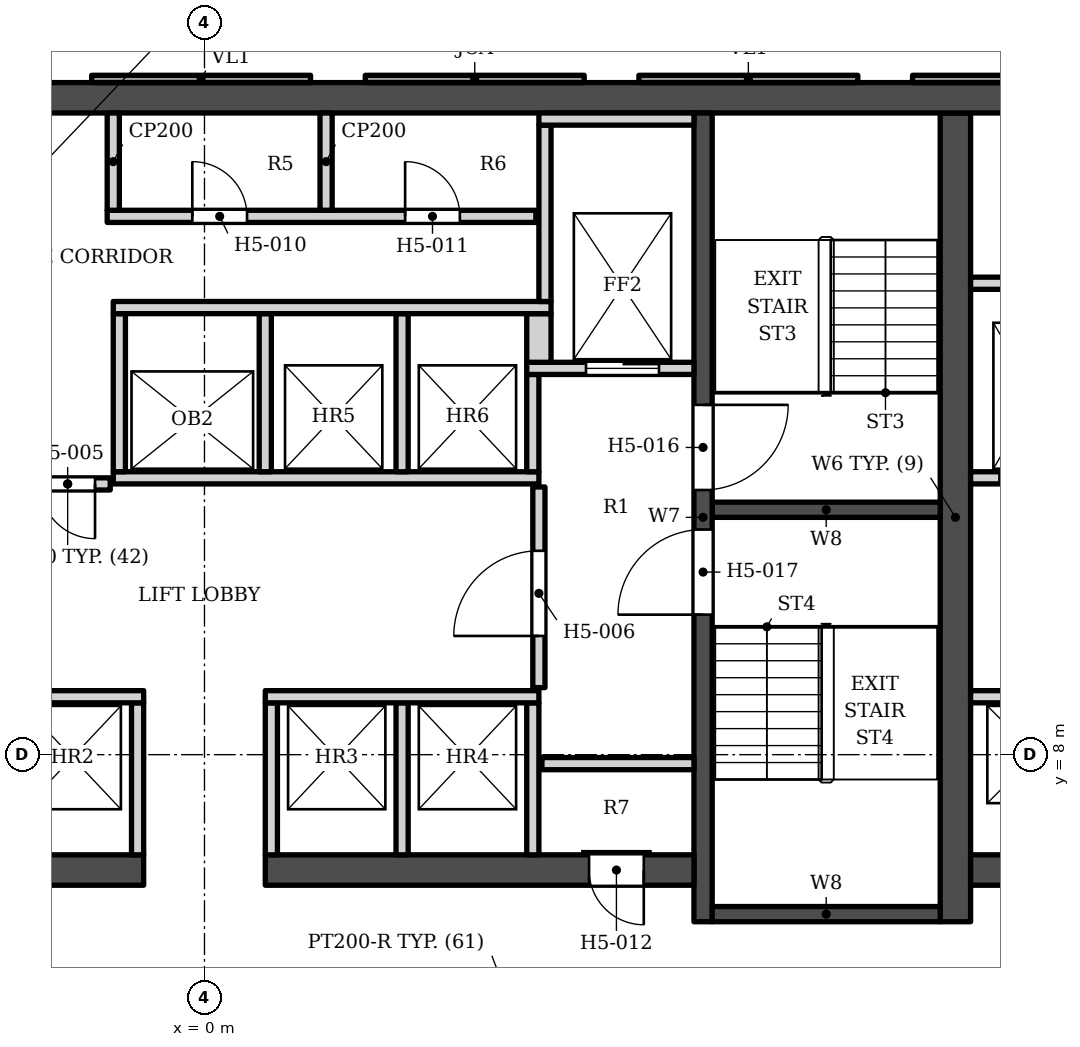
"""IFC4 building model, lengths in metres.
Left out: names, types, materials, properties, quantities, classifications, styles, units other than length and angle.
Written with IfcOpenShell. Run it as: python <this file> out.ifc"""

import sys

from ifc_helpers import new_model, si_unit, direction, frame, frame_2d, origin, place, context, subcontext, project, spatial, polyline, rectangle, outline, extrude, element, fill, save


model = new_model("IFC4")
c1 = context("Model", 3, precision=1e-05, world=origin(), true_north=direction((0.0, 1.0)))
c2 = subcontext(c1, "Body", "Model", "MODEL_VIEW")
j1 = project(units=[si_unit("LENGTHUNIT", "METRE"), si_unit("PLANEANGLEUNIT", "RADIAN")], contexts=[c1])
p1 = place(None, origin())
s1 = spatial("IfcSite", under=j1, at=p1, CompositionType="ELEMENT")
p2 = place(p1, origin())
s2 = spatial("IfcBuilding", under=s1, at=p2, CompositionType="ELEMENT")
p3 = place(p2, frame((0.0, 0.0, 91.8)))
s3 = spatial("IfcBuildingStorey", under=s2, at=p3, CompositionType="ELEMENT", Elevation=91.8)
p4 = place(p3, frame((-16.9, 18.802, 0.0), z_axis=(0.0, 0.0, 1.0), x_axis=(1.0, 0.0, 0.0)))
e1 = element("IfcWall", 1, at=p4, inside=s3, PredefinedType="SHEAR", context=c2, shape_type="SweptSolid", body=[
    extrude(rectangle(XDim=33.8, YDim=0.5, at=frame_2d((16.9, 0.0))), origin(), (0.0, 0.0, 1.0), 3.4),
])
p5 = place(p3, frame((12.35, 5.253, 0.0), z_axis=(0.0, 0.0, 1.0), x_axis=(0.0, 1.0, 0.0)))
e2 = element("IfcWall", 2, at=p5, inside=s3, PredefinedType="SHEAR", context=c2, shape_type="SweptSolid", body=[
    extrude(rectangle(XDim=13.3, YDim=0.5, at=frame_2d((6.65, 0.0))), origin(), (0.0, 0.0, 1.0), 3.4),
])
p6 = place(p3, frame((8.2, 5.253, 0.0), z_axis=(0.0, 0.0, 1.0), x_axis=(0.0, 1.0, 0.0)))
e3 = element("IfcWall", 3, at=p6, inside=s3, PredefinedType="SHEAR", context=c2, shape_type="SweptSolid", body=[
    extrude(rectangle(XDim=13.3, YDim=0.3, at=frame_2d((6.65, 0.0))), origin(), (0.0, 0.0, 1.0), 3.4),
])
p7 = place(p6, frame((7.1, 0.0, 0.0)))
e4 = element("IfcOpeningElement", 4, at=p7, cuts=e3, PredefinedType="OPENING", context=c2, shape_type="SweptSolid", body=[
    extrude(rectangle(XDim=1.4, YDim=2.1, at=frame_2d((0.7, 1.05))), frame((0.0, 0.16, 0.0), z_axis=(0.0, -1.0, 0.0), x_axis=(1.0, 0.0, 0.0)), (0.0, 0.0, 1.0), 0.32),
])
p8 = place(p6, frame((5.05, 0.0, 0.0)))
e5 = element("IfcOpeningElement", 5, at=p8, cuts=e3, PredefinedType="OPENING", context=c2, shape_type="SweptSolid", body=[
    extrude(rectangle(XDim=1.4, YDim=2.1, at=frame_2d((0.7, 1.05))), frame((0.0, 0.16, 0.0), z_axis=(0.0, -1.0, 0.0), x_axis=(1.0, 0.0, 0.0)), (0.0, 0.0, 1.0), 0.32),
])
for number, where, z_axis, x_axis in (
    (6, (8.35, 12.028, 0.0), (0.0, 0.0, 1.0), (1.0, 0.0, 0.0)),
    (7, (8.35, 5.378, 0.0), (0.0, 0.0, 1.0), (1.0, 0.0, 0.0)),
):
    element("IfcWall", number, at=place(p3, frame(where, z_axis=z_axis, x_axis=x_axis)), inside=s3, PredefinedType="SHEAR", context=c2, shape_type="SweptSolid", body=[
        extrude(rectangle(XDim=3.75, YDim=0.25, at=frame_2d((1.875, 0.0))), origin(), (0.0, 0.0, 1.0), 3.4),
    ])
p9 = place(p3, frame((-8.05, 6.103, 0.0), z_axis=(0.0, 0.0, 1.0), x_axis=(1.0, 0.0, 0.0)))
e8 = element("IfcWall", 8, at=p9, inside=s3, PredefinedType="SHEAR", context=c2, shape_type="SweptSolid", body=[
    extrude(rectangle(XDim=7.05, YDim=0.5, at=frame_2d((3.525, 0.0))), origin(), (0.0, 0.0, 1.0), 3.4),
])
p10 = place(p9, frame((0.825, 0.0, 0.0)))
e9 = element("IfcOpeningElement", 9, at=p10, cuts=e8, PredefinedType="OPENING", context=c2, shape_type="SweptSolid", body=[
    extrude(rectangle(XDim=0.9, YDim=2.1, at=frame_2d((0.45, 1.05))), frame((0.0, 0.26, 0.0), z_axis=(0.0, -1.0, 0.0), x_axis=(1.0, 0.0, 0.0)), (0.0, 0.0, 1.0), 0.52),
])
p11 = place(p3, frame((1.0, 6.103, 0.0), z_axis=(0.0, 0.0, 1.0), x_axis=(1.0, 0.0, 0.0)))
e10 = element("IfcWall", 10, at=p11, inside=s3, PredefinedType="SHEAR", context=c2, shape_type="SweptSolid", body=[
    extrude(rectangle(XDim=7.05, YDim=0.5, at=frame_2d((3.525, 0.0))), origin(), (0.0, 0.0, 1.0), 3.4),
])
p12 = place(p11, frame((5.325, 0.0, 0.0)))
e11 = element("IfcOpeningElement", 11, at=p12, cuts=e10, PredefinedType="OPENING", context=c2, shape_type="SweptSolid", body=[
    extrude(rectangle(XDim=0.9, YDim=2.1, at=frame_2d((0.45, 1.05))), frame((0.0, 0.26, 0.0), z_axis=(0.0, -1.0, 0.0), x_axis=(1.0, 0.0, 0.0)), (0.0, 0.0, 1.0), 0.52),
])
p13 = place(p3, frame((12.6, 6.103, 0.0), z_axis=(0.0, 0.0, 1.0), x_axis=(1.0, 0.0, 0.0)))
e12 = element("IfcWall", 12, at=p13, inside=s3, PredefinedType="SHEAR", context=c2, shape_type="SweptSolid", body=[
    extrude(rectangle(XDim=4.3, YDim=0.5, at=frame_2d((2.15, 0.0))), origin(), (0.0, 0.0, 1.0), 3.4),
])
p14 = place(p3, origin())
e13 = element("IfcWall", 13, at=p14, inside=s3, PredefinedType="SOLIDWALL", context=c2, shape_type="SweptSolid", body=[
    extrude(outline(polyline([(11.645, 19.173), (11.645, 19.052), (15.245, 19.052), (15.245, 19.173), (11.645, 19.173)])), origin(), (0.0, 0.0, 1.0), 2.65),
])
p15 = place(p3, origin())
e14 = element("IfcWall", 14, at=p15, inside=s3, PredefinedType="ELEMENTEDWALL", context=c2, shape_type="SweptSolid", body=[
    extrude(outline(polyline([(7.145, 19.173), (7.145, 19.052), (10.745, 19.052), (10.745, 19.173), (7.145, 19.173)])), origin(), (0.0, 0.0, 1.0), 2.65),
])
p16 = place(p3, origin())
e15 = element("IfcWall", 15, at=p16, inside=s3, PredefinedType="SOLIDWALL", context=c2, shape_type="SweptSolid", body=[
    extrude(outline(polyline([(2.645, 19.173), (2.645, 19.052), (6.245, 19.052), (6.245, 19.173), (2.645, 19.173)])), origin(), (0.0, 0.0, 1.0), 2.65),
])
p17 = place(p3, origin())
e16 = element("IfcWall", 16, at=p17, inside=s3, PredefinedType="ELEMENTEDWALL", context=c2, shape_type="SweptSolid", body=[
    extrude(outline(polyline([(-1.855, 19.173), (-1.855, 19.052), (1.745, 19.052), (1.745, 19.173), (-1.855, 19.173)])), origin(), (0.0, 0.0, 1.0), 2.65),
])
for number, where, z_axis, x_axis in (
    (17, (-1.1, 6.353, 0.0), (0.0, 0.0, 1.0), (0.0, 1.0, 0.0)),
    (18, (1.1, 6.353, 0.0), (0.0, 0.0, 1.0), (0.0, 1.0, 0.0)),
    (19, (3.25, 6.353, 0.0), (0.0, 0.0, 1.0), (0.0, 1.0, 0.0)),
    (20, (5.4, 6.353, 0.0), (0.0, 0.0, 1.0), (0.0, 1.0, 0.0)),
    (21, (5.55, 7.853, 0.0), (0.0, 0.0, 1.0), (1.0, 0.0, 0.0)),
):
    element("IfcWall", number, at=place(p3, frame(where, z_axis=z_axis, x_axis=x_axis)), inside=s3, PredefinedType="SOLIDWALL", context=c2, shape_type="SweptSolid", body=[
        extrude(rectangle(XDim=2.5, YDim=0.2, at=frame_2d((1.25, 0.0))), origin(), (0.0, 0.0, 1.0), 3.23),
    ])
for number, where, z_axis, x_axis in (
    (22, (-5.5, 8.953, 0.0), (0.0, 0.0, 1.0), (1.0, 0.0, 0.0)),
    (23, (1.0, 8.953, 0.0), (0.0, 0.0, 1.0), (1.0, 0.0, 0.0)),
):
    element("IfcWall", number, at=place(p3, frame(where, z_axis=z_axis, x_axis=x_axis)), inside=s3, PredefinedType="SOLIDWALL", context=c2, shape_type="SweptSolid", body=[
        extrude(rectangle(XDim=4.5, YDim=0.2, at=frame_2d((2.25, 0.0))), origin(), (0.0, 0.0, 1.0), 3.23),
    ])
p18 = place(p3, frame((12.6, 8.953, 0.0), z_axis=(0.0, 0.0, 1.0), x_axis=(1.0, 0.0, 0.0)))
e24 = element("IfcWall", 24, at=p18, inside=s3, PredefinedType="SOLIDWALL", context=c2, shape_type="SweptSolid", body=[
    extrude(rectangle(XDim=4.3, YDim=0.2, at=frame_2d((2.15, 0.0))), origin(), (0.0, 0.0, 1.0), 3.23),
])
p19 = place(p18, frame((0.525, 0.0, 0.0)))
e25 = element("IfcOpeningElement", 25, at=p19, cuts=e24, PredefinedType="OPENING", context=c2, shape_type="SweptSolid", body=[
    extrude(rectangle(XDim=1.1, YDim=2.1, at=frame_2d((0.55, 1.05))), frame((0.0, 0.11, 0.0), z_axis=(0.0, -1.0, 0.0), x_axis=(1.0, 0.0, 0.0)), (0.0, 0.0, 1.0), 0.22),
])
p20 = place(p18, frame((2.775, 0.0, 0.0)))
e26 = element("IfcOpeningElement", 26, at=p20, cuts=e24, PredefinedType="OPENING", context=c2, shape_type="SweptSolid", body=[
    extrude(rectangle(XDim=1.1, YDim=2.1, at=frame_2d((0.55, 1.05))), frame((0.0, 0.11, 0.0), z_axis=(0.0, -1.0, 0.0), x_axis=(1.0, 0.0, 0.0)), (0.0, 0.0, 1.0), 0.22),
])
p21 = place(p3, frame((5.5, 9.103, 0.0), z_axis=(0.0, 0.0, 1.0), x_axis=(0.0, 1.0, 0.0)))
e27 = element("IfcWall", 27, at=p21, inside=s3, PredefinedType="SOLIDWALL", context=c2, shape_type="SweptSolid", body=[
    extrude(rectangle(XDim=3.3, YDim=0.2, at=frame_2d((1.65, 0.0))), origin(), (0.0, 0.0, 1.0), 3.23),
])
p22 = place(p21, frame((0.85, 0.0, 0.0)))
e28 = element("IfcOpeningElement", 28, at=p22, cuts=e27, PredefinedType="OPENING", context=c2, shape_type="SweptSolid", body=[
    extrude(rectangle(XDim=1.4, YDim=2.1, at=frame_2d((0.7, 1.05))), frame((0.0, 0.11, 0.0), z_axis=(0.0, -1.0, 0.0), x_axis=(1.0, 0.0, 0.0)), (0.0, 0.0, 1.0), 0.22),
])
p23 = place(p3, frame((-2.95, 12.453, 0.0), z_axis=(0.0, 0.0, 1.0), x_axis=(1.0, 0.0, 0.0)))
e29 = element("IfcWall", 29, at=p23, inside=s3, PredefinedType="SOLIDWALL", context=c2, shape_type="SweptSolid", body=[
    extrude(rectangle(XDim=1.4, YDim=0.2, at=frame_2d((0.7, 0.0))), origin(), (0.0, 0.0, 1.0), 3.23),
])
p24 = place(p23, frame((0.25, 0.0, 0.0)))
e30 = element("IfcOpeningElement", 30, at=p24, cuts=e29, PredefinedType="OPENING", context=c2, shape_type="SweptSolid", body=[
    extrude(rectangle(XDim=0.9, YDim=2.1, at=frame_2d((0.45, 1.05))), frame((0.0, 0.11, 0.0), z_axis=(0.0, -1.0, 0.0), x_axis=(1.0, 0.0, 0.0)), (0.0, 0.0, 1.0), 0.22),
])
p25 = place(p3, frame((-1.5, 12.552, 0.0), z_axis=(0.0, 0.0, 1.0), x_axis=(1.0, 0.0, 0.0)))
e31 = element("IfcWall", 31, at=p25, inside=s3, PredefinedType="SOLIDWALL", context=c2, shape_type="SweptSolid", body=[
    extrude(rectangle(XDim=7.0, YDim=0.2, at=frame_2d((3.5, 0.0))), origin(), (0.0, 0.0, 1.0), 3.23),
])
p26 = place(p3, frame((12.6, 12.552, 0.0), z_axis=(0.0, 0.0, 1.0), x_axis=(1.0, 0.0, 0.0)))
e32 = element("IfcWall", 32, at=p26, inside=s3, PredefinedType="SOLIDWALL", context=c2, shape_type="SweptSolid", body=[
    extrude(rectangle(XDim=4.3, YDim=0.2, at=frame_2d((2.15, 0.0))), origin(), (0.0, 0.0, 1.0), 3.23),
])
p27 = place(p26, frame((0.475, 0.0, 0.0)))
e33 = element("IfcOpeningElement", 33, at=p27, cuts=e32, PredefinedType="OPENING", context=c2, shape_type="SweptSolid", body=[
    extrude(rectangle(XDim=1.2, YDim=2.1, at=frame_2d((0.6, 1.05))), frame((0.0, 0.11, 0.0), z_axis=(0.0, -1.0, 0.0), x_axis=(1.0, 0.0, 0.0)), (0.0, 0.0, 1.0), 0.22),
])
p28 = place(p26, frame((2.625, 0.0, 0.0)))
e34 = element("IfcOpeningElement", 34, at=p28, cuts=e32, PredefinedType="OPENING", context=c2, shape_type="SweptSolid", body=[
    extrude(rectangle(XDim=1.4, YDim=2.1, at=frame_2d((0.7, 1.05))), frame((0.0, 0.11, 0.0), z_axis=(0.0, -1.0, 0.0), x_axis=(1.0, 0.0, 0.0)), (0.0, 0.0, 1.0), 0.22),
])
for number, where, z_axis, x_axis in (
    (35, (-1.4, 12.653, 0.0), (0.0, 0.0, 1.0), (0.0, 1.0, 0.0)),
    (36, (1.0, 12.653, 0.0), (0.0, 0.0, 1.0), (0.0, 1.0, 0.0)),
    (37, (3.25, 12.653, 0.0), (0.0, 0.0, 1.0), (0.0, 1.0, 0.0)),
):
    element("IfcWall", number, at=place(p3, frame(where, z_axis=z_axis, x_axis=x_axis)), inside=s3, PredefinedType="SOLIDWALL", context=c2, shape_type="SweptSolid", body=[
        extrude(rectangle(XDim=2.6, YDim=0.2, at=frame_2d((1.3, 0.0))), origin(), (0.0, 0.0, 1.0), 3.23),
    ])
p29 = place(p3, frame((5.4, 12.653, 0.0), z_axis=(0.0, 0.0, 1.0), x_axis=(0.0, 1.0, 0.0)))
e38 = element("IfcWall", 38, at=p29, inside=s3, PredefinedType="SOLIDWALL", context=c2, shape_type="SweptSolid", body=[
    extrude(rectangle(XDim=1.6, YDim=0.2, at=frame_2d((0.8, 0.0))), origin(), (0.0, 0.0, 1.0), 3.23),
])
p30 = place(p3, frame((5.3, 14.353, 0.0), z_axis=(0.0, 0.0, 1.0), x_axis=(1.0, 0.0, 0.0)))
e39 = element("IfcWall", 39, at=p30, inside=s3, PredefinedType="SOLIDWALL", context=c2, shape_type="SweptSolid", body=[
    extrude(rectangle(XDim=2.75, YDim=0.2, at=frame_2d((1.375, 0.0))), origin(), (0.0, 0.0, 1.0), 3.23),
])
p31 = place(p30, frame((0.975, 0.0, 0.0)))
e40 = element("IfcOpeningElement", 40, at=p31, cuts=e39, PredefinedType="OPENING", context=c2, shape_type="SweptSolid", body=[
    extrude(rectangle(XDim=1.2, YDim=2.1, at=frame_2d((0.6, 1.05))), frame((0.0, 0.11, 0.0), z_axis=(0.0, -1.0, 0.0), x_axis=(1.0, 0.0, 0.0)), (0.0, 0.0, 1.0), 0.22),
])
p32 = place(p3, frame((5.5, 14.453, 0.0), z_axis=(0.0, 0.0, 1.0), x_axis=(0.0, 1.0, 0.0)))
e41 = element("IfcWall", 41, at=p32, inside=s3, PredefinedType="SOLIDWALL", context=c2, shape_type="SweptSolid", body=[
    extrude(rectangle(XDim=0.8, YDim=0.4, at=frame_2d((0.4, 0.0))), origin(), (0.0, 0.0, 1.0), 3.23),
])
p33 = place(p3, frame((-1.5, 15.353, 0.0), z_axis=(0.0, 0.0, 1.0), x_axis=(1.0, 0.0, 0.0)))
e42 = element("IfcWall", 42, at=p33, inside=s3, PredefinedType="SOLIDWALL", context=c2, shape_type="SweptSolid", body=[
    extrude(rectangle(XDim=7.2, YDim=0.2, at=frame_2d((3.6, 0.0))), origin(), (0.0, 0.0, 1.0), 3.23),
])
p34 = place(p3, frame((5.6, 15.453, 0.0), z_axis=(0.0, 0.0, 1.0), x_axis=(0.0, 1.0, 0.0)))
e43 = element("IfcWall", 43, at=p34, inside=s3, PredefinedType="SOLIDWALL", context=c2, shape_type="SweptSolid", body=[
    extrude(rectangle(XDim=2.9, YDim=0.2, at=frame_2d((1.45, 0.0))), origin(), (0.0, 0.0, 1.0), 3.23),
])
p35 = place(p3, frame((12.6, 15.753, 0.0), z_axis=(0.0, 0.0, 1.0), x_axis=(1.0, 0.0, 0.0)))
e44 = element("IfcWall", 44, at=p35, inside=s3, PredefinedType="SOLIDWALL", context=c2, shape_type="SweptSolid", body=[
    extrude(rectangle(XDim=4.3, YDim=0.2, at=frame_2d((2.15, 0.0))), origin(), (0.0, 0.0, 1.0), 3.23),
])
p36 = place(p3, frame((-1.6, 16.853, 0.0), z_axis=(0.0, 0.0, 1.0), x_axis=(1.0, 0.0, 0.0)))
e45 = element("IfcWall", 45, at=p36, inside=s3, PredefinedType="SOLIDWALL", context=c2, shape_type="SweptSolid", body=[
    extrude(rectangle(XDim=7.05, YDim=0.2, at=frame_2d((3.525, 0.0))), origin(), (0.0, 0.0, 1.0), 3.23),
])
p37 = place(p36, frame((1.4, 0.0, 0.0)))
e46 = element("IfcOpeningElement", 46, at=p37, cuts=e45, PredefinedType="OPENING", context=c2, shape_type="SweptSolid", body=[
    extrude(rectangle(XDim=0.9, YDim=2.1, at=frame_2d((0.45, 1.05))), frame((0.0, 0.11, 0.0), z_axis=(0.0, -1.0, 0.0), x_axis=(1.0, 0.0, 0.0)), (0.0, 0.0, 1.0), 0.22),
])
p38 = place(p36, frame((4.9, 0.0, 0.0)))
e47 = element("IfcOpeningElement", 47, at=p38, cuts=e45, PredefinedType="OPENING", context=c2, shape_type="SweptSolid", body=[
    extrude(rectangle(XDim=0.9, YDim=2.1, at=frame_2d((0.45, 1.05))), frame((0.0, 0.11, 0.0), z_axis=(0.0, -1.0, 0.0), x_axis=(1.0, 0.0, 0.0)), (0.0, 0.0, 1.0), 0.22),
])
for number, where, z_axis, x_axis in (
    (48, (-1.5, 16.953, 0.0), (0.0, 0.0, 1.0), (0.0, 1.0, 0.0)),
    (49, (2.0, 16.953, 0.0), (0.0, 0.0, 1.0), (0.0, 1.0, 0.0)),
):
    element("IfcWall", number, at=place(p3, frame(where, z_axis=z_axis, x_axis=x_axis)), inside=s3, PredefinedType="PARTITIONING", context=c2, shape_type="SweptSolid", body=[
        extrude(rectangle(XDim=1.6, YDim=0.2, at=frame_2d((0.8, 0.0))), origin(), (0.0, 0.0, 1.0), 3.23),
    ])
p39 = place(p3, frame((5.5, 18.453, 0.0), z_axis=(0.0, 0.0, 1.0), x_axis=(1.0, 0.0, 0.0)))
e50 = element("IfcWall", 50, at=p39, inside=s3, PredefinedType="SOLIDWALL", context=c2, shape_type="SweptSolid", body=[
    extrude(rectangle(XDim=2.55, YDim=0.2, at=frame_2d((1.275, 0.0))), origin(), (0.0, 0.0, 1.0), 3.23),
])
p40 = place(p31, origin())
e51 = element("IfcDoor", 51, at=p40, inside=s3, OperationType="DOUBLE_DOOR_SLIDING", PredefinedType="DOOR", context=c2, shape_type="SweptSolid", body=[
    extrude(rectangle(XDim=1.2, YDim=2.1, at=frame_2d((0.6, 1.05))), frame((0.0, 0.025, 0.0), z_axis=(0.0, -1.0, 0.0), x_axis=(1.0, 0.0, 0.0)), (0.0, 0.0, 1.0), 0.05),
])
fill(e40, e51)
p41 = place(p27, origin())
e52 = element("IfcDoor", 52, at=p41, inside=s3, OperationType="DOUBLE_DOOR_SLIDING", PredefinedType="DOOR", context=c2, shape_type="SweptSolid", body=[
    extrude(rectangle(XDim=1.2, YDim=2.1, at=frame_2d((0.6, 1.05))), frame((0.0, 0.025, 0.0), z_axis=(0.0, -1.0, 0.0), x_axis=(1.0, 0.0, 0.0)), (0.0, 0.0, 1.0), 0.05),
])
fill(e33, e52)
p42 = place(p7, origin())
e53 = element("IfcDoor", 53, at=p42, inside=s3, OperationType="SINGLE_SWING_RIGHT", PredefinedType="DOOR", context=c2, shape_type="SweptSolid", body=[
    extrude(rectangle(XDim=1.4, YDim=2.1, at=frame_2d((0.7, 1.05))), frame((0.0, 0.025, 0.0), z_axis=(0.0, -1.0, 0.0), x_axis=(1.0, 0.0, 0.0)), (0.0, 0.0, 1.0), 0.05),
])
fill(e4, e53)
p43 = place(p8, origin())
e54 = element("IfcDoor", 54, at=p43, inside=s3, OperationType="SINGLE_SWING_LEFT", PredefinedType="DOOR", context=c2, shape_type="SweptSolid", body=[
    extrude(rectangle(XDim=1.4, YDim=2.1, at=frame_2d((0.7, 1.05))), frame((0.0, 0.025, 0.0), z_axis=(0.0, -1.0, 0.0), x_axis=(1.0, 0.0, 0.0)), (0.0, 0.0, 1.0), 0.05),
])
fill(e5, e54)
p44 = place(p24, origin())
e55 = element("IfcDoor", 55, at=p44, inside=s3, OperationType="SINGLE_SWING_RIGHT", PredefinedType="DOOR", context=c2, shape_type="SweptSolid", body=[
    extrude(rectangle(XDim=0.9, YDim=2.1, at=frame_2d((0.45, 1.05))), frame((0.0, 0.025, 0.0), z_axis=(0.0, -1.0, 0.0), x_axis=(1.0, 0.0, 0.0)), (0.0, 0.0, 1.0), 0.05),
])
fill(e30, e55)
p45 = place(p22, origin())
e56 = element("IfcDoor", 56, at=p45, inside=s3, OperationType="SINGLE_SWING_LEFT", PredefinedType="DOOR", context=c2, shape_type="SweptSolid", body=[
    extrude(rectangle(XDim=1.4, YDim=2.1, at=frame_2d((0.7, 1.05))), frame((0.0, 0.025, 0.0), z_axis=(0.0, -1.0, 0.0), x_axis=(1.0, 0.0, 0.0)), (0.0, 0.0, 1.0), 0.05),
])
fill(e28, e56)
p46 = place(p37, origin())
e57 = element("IfcDoor", 57, at=p46, inside=s3, OperationType="SINGLE_SWING_LEFT", PredefinedType="DOOR", context=c2, shape_type="SweptSolid", body=[
    extrude(rectangle(XDim=0.9, YDim=2.1, at=frame_2d((0.45, 1.05))), frame((0.0, 0.025, 0.0), z_axis=(0.0, -1.0, 0.0), x_axis=(1.0, 0.0, 0.0)), (0.0, 0.0, 1.0), 0.05),
])
fill(e46, e57)
p47 = place(p38, origin())
e58 = element("IfcDoor", 58, at=p47, inside=s3, OperationType="SINGLE_SWING_LEFT", PredefinedType="DOOR", context=c2, shape_type="SweptSolid", body=[
    extrude(rectangle(XDim=0.9, YDim=2.1, at=frame_2d((0.45, 1.05))), frame((0.0, 0.025, 0.0), z_axis=(0.0, -1.0, 0.0), x_axis=(1.0, 0.0, 0.0)), (0.0, 0.0, 1.0), 0.05),
])
fill(e47, e58)
p48 = place(p12, origin())
e59 = element("IfcDoor", 59, at=p48, inside=s3, OperationType="SINGLE_SWING_RIGHT", PredefinedType="DOOR", context=c2, shape_type="SweptSolid", body=[
    extrude(rectangle(XDim=0.9, YDim=2.1, at=frame_2d((0.45, 1.05))), frame((0.0, 0.025, 0.0), z_axis=(0.0, -1.0, 0.0), x_axis=(1.0, 0.0, 0.0)), (0.0, 0.0, 1.0), 0.05),
])
fill(e11, e59)
save(model, sys.argv[1])
